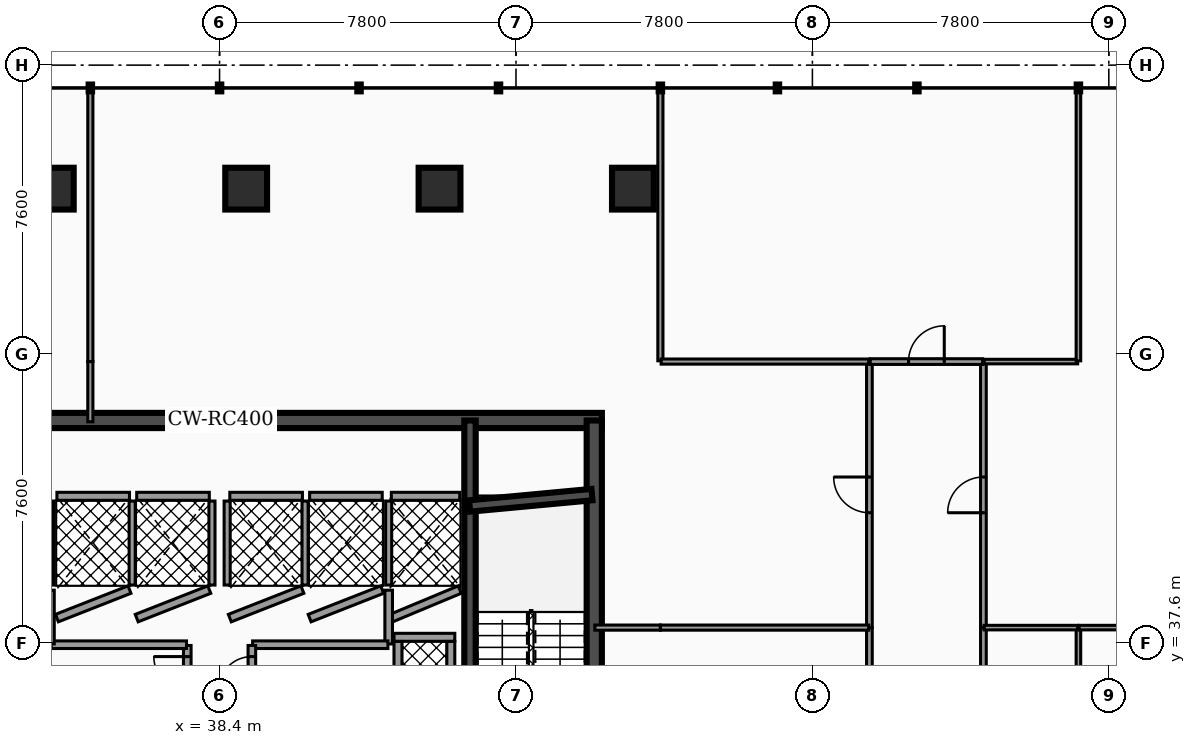
"""IFC4 building model, lengths in metres.
Left out: names, types, materials, properties, quantities, classifications, styles, units other than length and angle.
Written with IfcOpenShell. Run it as: python <this file> out.ifc"""

import sys

from ifc_helpers import new_model, si_unit, direction, frame, frame_2d, origin, origin_2d, place, context, subcontext, project, spatial, rectangle, hollow_rectangle, extrude, element, fill, save


model = new_model("IFC4")
c1 = context("Model", 3, precision=1e-05, world=origin(), true_north=direction((0.0, 1.0)))
c2 = subcontext(c1, "Body", "Model", "MODEL_VIEW")
j1 = project(units=[si_unit("LENGTHUNIT", "METRE"), si_unit("PLANEANGLEUNIT", "RADIAN")], contexts=[c1])
p1 = place(None, origin())
s1 = spatial("IfcSite", under=j1, at=p1, CompositionType="ELEMENT")
p2 = place(p1, origin())
s2 = spatial("IfcBuilding", under=s1, at=p2, CompositionType="ELEMENT")
p3 = place(p2, frame((0.0, 0.0, 5.1)))
s3 = spatial("IfcBuildingStorey", under=s2, at=p3, CompositionType="ELEMENT", Elevation=5.1)
p4 = place(p3, frame((28.4, 43.45, 0.0), z_axis=(0.0, 0.0, 1.0), x_axis=(1.0, 0.0, 0.0)))
e1 = element("IfcWall", 1, at=p4, inside=s3, PredefinedType="SHEAR", context=c2, shape_type="SweptSolid", body=[
    extrude(rectangle(XDim=20.06, YDim=0.4, at=frame_2d((10.03, 0.0))), origin(), (0.0, 0.0, 1.0), 4.14),
])
p5 = place(p3, frame((44.99, 33.25, 0.0), z_axis=(0.0, 0.0, 1.0), x_axis=(0.0, 1.0, 0.0)))
e2 = element("IfcWall", 2, at=p5, inside=s3, PredefinedType="SHEAR", context=c2, shape_type="SweptSolid", body=[
    extrude(rectangle(XDim=10.2, YDim=0.3, at=frame_2d((5.1, 0.0))), origin(), (0.0, 0.0, 1.0), 4.14),
])
p6 = place(p3, frame((48.26, 33.25, 0.0), z_axis=(0.0, 0.0, 1.0), x_axis=(0.0, 1.0, 0.0)))
e3 = element("IfcWall", 3, at=p6, inside=s3, PredefinedType="SHEAR", context=c2, shape_type="SweptSolid", body=[
    extrude(rectangle(XDim=10.2, YDim=0.4, at=frame_2d((5.1, 0.0))), origin(), (0.0, 0.0, 1.0), 4.14),
])
p7 = place(p3, frame((44.98, 41.2, 0.0), z_axis=(0.0, 0.0, 1.0), x_axis=(0.995686468965, 0.09278176286, 0.0)))
e4 = element("IfcWall", 4, at=p7, inside=s3, PredefinedType="SHEAR", context=c2, shape_type="SweptSolid", body=[
    extrude(rectangle(XDim=3.234, YDim=0.3, at=frame_2d((1.617, 0.0))), origin(), (0.0, 0.0, 1.0), 4.14),
])
for number, where, z_axis, x_axis in (
    (5, (49.277, 49.55, 0.0), (0.0, 0.0, 1.0), (1.0, 0.0, 0.0)),
    (6, (44.188, 49.55, 0.0), (0.0, 0.0, 1.0), (1.0, 0.0, 0.0)),
    (7, (39.1, 49.55, 0.0), (0.0, 0.0, 1.0), (1.0, 0.0, 0.0)),
    (8, (34.011, 49.55, 0.0), (0.0, 0.0, 1.0), (1.0, 0.0, 0.0)),
):
    element("IfcColumn", number, at=place(p3, frame(where, z_axis=z_axis, x_axis=x_axis)), inside=s3, PredefinedType="COLUMN", context=c2, shape_type="SweptSolid", body=[
        extrude(hollow_rectangle(XDim=1.1, YDim=1.1, WallThickness=0.055, at=origin_2d()), origin(), (0.0, 0.0, 1.0), 4.14),
    ])
p8 = place(p3, frame((33.95, 39.12, 0.0), z_axis=(0.0, 0.0, 1.0), x_axis=(0.0, 1.0, 0.0)))
e9 = element("IfcWall", 9, at=p8, inside=s3, PredefinedType="SOLIDWALL", context=c2, shape_type="SweptSolid", body=[
    extrude(rectangle(XDim=2.21, YDim=0.16, at=frame_2d((1.105, 0.0))), origin(), (0.0, 0.0, 1.0), 3.112),
])
p9 = place(p3, frame((42.92, 38.25, 0.0), z_axis=(0.0, 0.0, 1.0), x_axis=(0.9230806271, 0.384606494839, 0.0)))
e10 = element("IfcWall", 10, at=p9, inside=s3, PredefinedType="SOLIDWALL", context=c2, shape_type="SweptSolid", body=[
    extrude(rectangle(XDim=1.95, YDim=0.21, at=frame_2d((0.975, 0.0))), origin(), (0.0, 0.0, 1.0), 3.112),
])
p10 = place(p3, frame((42.92, 41.455, 0.0), z_axis=(0.0, 0.0, 1.0), x_axis=(1.0, 0.0, 0.0)))
e11 = element("IfcWall", 11, at=p10, inside=s3, PredefinedType="SOLIDWALL", context=c2, shape_type="SweptSolid", body=[
    extrude(rectangle(XDim=1.8, YDim=0.21, at=frame_2d((0.9, 0.0))), origin(), (0.0, 0.0, 1.0), 3.112),
])
p11 = place(p3, frame((42.85, 39.12, 0.0), z_axis=(0.0, 0.0, 1.0), x_axis=(0.0, 1.0, 0.0)))
e12 = element("IfcWall", 12, at=p11, inside=s3, PredefinedType="SOLIDWALL", context=c2, shape_type="SweptSolid", body=[
    extrude(rectangle(XDim=2.21, YDim=0.16, at=frame_2d((1.105, 0.0))), origin(), (0.0, 0.0, 1.0), 3.112),
])
p12 = place(p3, frame((34.12, 38.25, 0.0), z_axis=(0.0, 0.0, 1.0), x_axis=(0.930804993012, 0.36551616241, 0.0)))
e13 = element("IfcWall", 13, at=p12, inside=s3, PredefinedType="SOLIDWALL", context=c2, shape_type="SweptSolid", body=[
    extrude(rectangle(XDim=2.052, YDim=0.21, at=frame_2d((1.026, 0.0))), origin(), (0.0, 0.0, 1.0), 3.112),
])
p13 = place(p3, frame((34.12, 41.455, 0.0), z_axis=(0.0, 0.0, 1.0), x_axis=(1.0, 0.0, 0.0)))
e14 = element("IfcWall", 14, at=p13, inside=s3, PredefinedType="SOLIDWALL", context=c2, shape_type="SweptSolid", body=[
    extrude(rectangle(XDim=1.91, YDim=0.21, at=frame_2d((0.955, 0.0))), origin(), (0.0, 0.0, 1.0), 3.112),
])
p14 = place(p3, frame((36.1, 39.12, 0.0), z_axis=(0.0, 0.0, 1.0), x_axis=(0.0, 1.0, 0.0)))
e15 = element("IfcWall", 15, at=p14, inside=s3, PredefinedType="SOLIDWALL", context=c2, shape_type="SweptSolid", body=[
    extrude(rectangle(XDim=2.21, YDim=0.16, at=frame_2d((1.105, 0.0))), origin(), (0.0, 0.0, 1.0), 3.112),
])
p15 = place(p3, frame((36.22, 38.25, 0.0), z_axis=(0.0, 0.0, 1.0), x_axis=(0.930804993012, 0.36551616241, 0.0)))
e16 = element("IfcWall", 16, at=p15, inside=s3, PredefinedType="SOLIDWALL", context=c2, shape_type="SweptSolid", body=[
    extrude(rectangle(XDim=2.052, YDim=0.21, at=frame_2d((1.026, 0.0))), origin(), (0.0, 0.0, 1.0), 3.112),
])
p16 = place(p3, frame((36.22, 41.455, 0.0), z_axis=(0.0, 0.0, 1.0), x_axis=(1.0, 0.0, 0.0)))
e17 = element("IfcWall", 17, at=p16, inside=s3, PredefinedType="SOLIDWALL", context=c2, shape_type="SweptSolid", body=[
    extrude(rectangle(XDim=1.91, YDim=0.21, at=frame_2d((0.955, 0.0))), origin(), (0.0, 0.0, 1.0), 3.112),
])
p17 = place(p3, frame((38.2, 39.12, 0.0), z_axis=(0.0, 0.0, 1.0), x_axis=(0.0, 1.0, 0.0)))
e18 = element("IfcWall", 18, at=p17, inside=s3, PredefinedType="SOLIDWALL", context=c2, shape_type="SweptSolid", body=[
    extrude(rectangle(XDim=2.21, YDim=0.16, at=frame_2d((1.105, 0.0))), origin(), (0.0, 0.0, 1.0), 3.112),
])
p18 = place(p3, frame((38.67, 38.25, 0.0), z_axis=(0.0, 0.0, 1.0), x_axis=(0.930820886763, 0.3654756856, 0.0)))
e19 = element("IfcWall", 19, at=p18, inside=s3, PredefinedType="SOLIDWALL", context=c2, shape_type="SweptSolid", body=[
    extrude(rectangle(XDim=2.052, YDim=0.21, at=frame_2d((1.026, 0.0))), origin(), (0.0, 0.0, 1.0), 3.112),
])
p19 = place(p3, frame((38.67, 41.455, 0.0), z_axis=(0.0, 0.0, 1.0), x_axis=(1.0, 0.0, 0.0)))
e20 = element("IfcWall", 20, at=p19, inside=s3, PredefinedType="SOLIDWALL", context=c2, shape_type="SweptSolid", body=[
    extrude(rectangle(XDim=1.91, YDim=0.21, at=frame_2d((0.955, 0.0))), origin(), (0.0, 0.0, 1.0), 3.112),
])
for number, where, z_axis, x_axis in (
    (21, (38.6, 39.12, 0.0), (0.0, 0.0, 1.0), (0.0, 1.0, 0.0)),
    (22, (40.65, 39.12, 0.0), (0.0, 0.0, 1.0), (0.0, 1.0, 0.0)),
):
    element("IfcWall", number, at=place(p3, frame(where, z_axis=z_axis, x_axis=x_axis)), inside=s3, PredefinedType="SOLIDWALL", context=c2, shape_type="SweptSolid", body=[
        extrude(rectangle(XDim=2.21, YDim=0.16, at=frame_2d((1.105, 0.0))), origin(), (0.0, 0.0, 1.0), 3.112),
    ])
p20 = place(p3, frame((40.77, 38.25, 0.0), z_axis=(0.0, 0.0, 1.0), x_axis=(0.930804993012, 0.36551616241, 0.0)))
e23 = element("IfcWall", 23, at=p20, inside=s3, PredefinedType="SOLIDWALL", context=c2, shape_type="SweptSolid", body=[
    extrude(rectangle(XDim=2.052, YDim=0.21, at=frame_2d((1.026, 0.0))), origin(), (0.0, 0.0, 1.0), 3.112),
])
p21 = place(p3, frame((40.77, 41.455, 0.0), z_axis=(0.0, 0.0, 1.0), x_axis=(1.0, 0.0, 0.0)))
e24 = element("IfcWall", 24, at=p21, inside=s3, PredefinedType="SOLIDWALL", context=c2, shape_type="SweptSolid", body=[
    extrude(rectangle(XDim=1.91, YDim=0.21, at=frame_2d((0.955, 0.0))), origin(), (0.0, 0.0, 1.0), 3.112),
])
p22 = place(p3, frame((42.99, 37.745, 0.0), z_axis=(0.0, 0.0, 1.0), x_axis=(1.0, 0.0, 0.0)))
e25 = element("IfcWall", 25, at=p22, inside=s3, PredefinedType="SOLIDWALL", context=c2, shape_type="SweptSolid", body=[
    extrude(rectangle(XDim=1.6, YDim=0.21, at=frame_2d((0.8, 0.0))), origin(), (0.0, 0.0, 1.0), 4.14),
])
for number, where, z_axis, x_axis in (
    (26, (43.095, 36.485, 0.0), (0.0, 0.0, 1.0), (0.0, 1.0, 0.0)),
    (27, (44.485, 36.485, 0.0), (0.0, 0.0, 1.0), (0.0, 1.0, 0.0)),
):
    element("IfcWall", number, at=place(p3, frame(where, z_axis=z_axis, x_axis=x_axis)), inside=s3, PredefinedType="SOLIDWALL", context=c2, shape_type="SweptSolid", body=[
        extrude(rectangle(XDim=1.15, YDim=0.21, at=frame_2d((0.575, 0.0))), origin(), (0.0, 0.0, 1.0), 4.14),
    ])
p23 = place(p3, frame((37.55, 33.265, 0.0), z_axis=(0.0, 0.0, 1.0), x_axis=(0.0, 1.0, 0.0)))
e28 = element("IfcWall", 28, at=p23, inside=s3, PredefinedType="PARTITIONING", context=c2, shape_type="SweptSolid", body=[
    extrude(rectangle(XDim=4.265, YDim=0.2, at=frame_2d((2.133, 0.0))), origin(), (0.0, 0.0, 1.0), 3.097),
])
p24 = place(p23, frame((3.093, 0.0, 0.0)))
e29 = element("IfcOpeningElement", 29, at=p24, cuts=e28, PredefinedType="OPENING", context=c2, shape_type="SweptSolid", body=[
    extrude(rectangle(XDim=0.88, YDim=2.05, at=frame_2d((0.44, 1.025))), frame((0.0, 0.11, 0.0), z_axis=(0.0, -1.0, 0.0), x_axis=(1.0, 0.0, 0.0)), (0.0, 0.0, 1.0), 0.22),
])
p25 = place(p3, frame((33.97, 37.55, 0.0), z_axis=(0.0, 0.0, 1.0), x_axis=(1.0, 0.0, 0.0)))
e30 = element("IfcWall", 30, at=p25, inside=s3, PredefinedType="PARTITIONING", context=c2, shape_type="SweptSolid", body=[
    extrude(rectangle(XDim=3.56, YDim=0.2, at=frame_2d((1.78, 0.0))), origin(), (0.0, 0.0, 1.0), 3.097),
])
for number, where, z_axis, x_axis in (
    (31, (33.95, 37.57, 0.0), (0.0, 0.0, 1.0), (0.0, 1.0, 0.0)),
    (32, (42.85, 37.57, 0.0), (0.0, 0.0, 1.0), (0.0, 1.0, 0.0)),
):
    element("IfcWall", number, at=place(p3, frame(where, z_axis=z_axis, x_axis=x_axis)), inside=s3, PredefinedType="PARTITIONING", context=c2, shape_type="SweptSolid", body=[
        extrude(rectangle(XDim=1.415, YDim=0.2, at=frame_2d((0.708, 0.0))), origin(), (0.0, 0.0, 1.0), 3.097),
    ])
p26 = place(p3, frame((39.27, 37.55, 0.0), z_axis=(0.0, 0.0, 1.0), x_axis=(1.0, 0.0, 0.0)))
e33 = element("IfcWall", 33, at=p26, inside=s3, PredefinedType="PARTITIONING", context=c2, shape_type="SweptSolid", body=[
    extrude(rectangle(XDim=3.56, YDim=0.2, at=frame_2d((1.78, 0.0))), origin(), (0.0, 0.0, 1.0), 3.097),
])
p27 = place(p3, frame((39.25, 33.265, 0.0), z_axis=(0.0, 0.0, 1.0), x_axis=(0.0, 1.0, 0.0)))
e34 = element("IfcWall", 34, at=p27, inside=s3, PredefinedType="PARTITIONING", context=c2, shape_type="SweptSolid", body=[
    extrude(rectangle(XDim=4.265, YDim=0.2, at=frame_2d((2.133, 0.0))), origin(), (0.0, 0.0, 1.0), 3.097),
])
p28 = place(p27, frame((3.093, 0.0, 0.0)))
e35 = element("IfcOpeningElement", 35, at=p28, cuts=e34, PredefinedType="OPENING", context=c2, shape_type="SweptSolid", body=[
    extrude(rectangle(XDim=0.88, YDim=2.05, at=frame_2d((0.44, 1.025))), frame((0.0, 0.11, 0.0), z_axis=(0.0, -1.0, 0.0), x_axis=(1.0, 0.0, 0.0)), (0.0, 0.0, 1.0), 0.22),
])
p29 = place(p3, frame((58.5, 30.17, 0.0), z_axis=(0.0, 0.0, 1.0), x_axis=(0.0, 1.0, 0.0)))
e36 = element("IfcWall", 36, at=p29, inside=s3, PredefinedType="PARTITIONING", context=c2, shape_type="SweptSolid", body=[
    extrude(rectangle(XDim=7.825, YDim=0.15, at=frame_2d((3.913, 0.0))), origin(), (0.0, 0.0, 1.0), 3.097),
])
p30 = place(p29, frame((3.353, 0.0, 0.0)))
e37 = element("IfcOpeningElement", 37, at=p30, cuts=e36, PredefinedType="OPENING", context=c2, shape_type="SweptSolid", body=[
    extrude(rectangle(XDim=1.12, YDim=2.05, at=frame_2d((0.56, 1.025))), frame((0.0, 0.085, 0.0), z_axis=(0.0, -1.0, 0.0), x_axis=(1.0, 0.0, 0.0)), (0.0, 0.0, 1.0), 0.17),
])
p31 = place(p3, frame((55.5, 30.17, 0.0), z_axis=(0.0, 0.0, 1.0), x_axis=(0.0, 1.0, 0.0)))
e38 = element("IfcWall", 38, at=p31, inside=s3, PredefinedType="PARTITIONING", context=c2, shape_type="SweptSolid", body=[
    extrude(rectangle(XDim=7.825, YDim=0.15, at=frame_2d((3.913, 0.0))), origin(), (0.0, 0.0, 1.0), 3.097),
])
p32 = place(p31, frame((3.442, 0.0, 0.0)))
e39 = element("IfcOpeningElement", 39, at=p32, cuts=e38, PredefinedType="OPENING", context=c2, shape_type="SweptSolid", body=[
    extrude(rectangle(XDim=0.94, YDim=2.05, at=frame_2d((0.47, 1.025))), frame((0.0, 0.085, 0.0), z_axis=(0.0, -1.0, 0.0), x_axis=(1.0, 0.0, 0.0)), (0.0, 0.0, 1.0), 0.17),
])
p33 = place(p3, frame((55.5, 38.005, 0.0), z_axis=(0.0, 0.0, 1.0), x_axis=(0.0, 1.0, 0.0)))
e40 = element("IfcWall", 40, at=p33, inside=s3, PredefinedType="PARTITIONING", context=c2, shape_type="SweptSolid", body=[
    extrude(rectangle(XDim=6.975, YDim=0.15, at=frame_2d((3.488, 0.0))), origin(), (0.0, 0.0, 1.0), 3.097),
])
p34 = place(p33, frame((3.018, 0.0, 0.0)))
e41 = element("IfcOpeningElement", 41, at=p34, cuts=e40, PredefinedType="OPENING", context=c2, shape_type="SweptSolid", body=[
    extrude(rectangle(XDim=0.94, YDim=2.05, at=frame_2d((0.47, 1.025))), frame((0.0, 0.085, 0.0), z_axis=(0.0, -1.0, 0.0), x_axis=(1.0, 0.0, 0.0)), (0.0, 0.0, 1.0), 0.17),
])
p35 = place(p3, frame((58.5, 38.005, 0.0), z_axis=(0.0, 0.0, 1.0), x_axis=(0.0, 1.0, 0.0)))
e42 = element("IfcWall", 42, at=p35, inside=s3, PredefinedType="PARTITIONING", context=c2, shape_type="SweptSolid", body=[
    extrude(rectangle(XDim=6.975, YDim=0.15, at=frame_2d((3.488, 0.0))), origin(), (0.0, 0.0, 1.0), 3.097),
])
p36 = place(p35, frame((3.018, 0.0, 0.0)))
e43 = element("IfcOpeningElement", 43, at=p36, cuts=e42, PredefinedType="OPENING", context=c2, shape_type="SweptSolid", body=[
    extrude(rectangle(XDim=0.94, YDim=2.05, at=frame_2d((0.47, 1.025))), frame((0.0, 0.085, 0.0), z_axis=(0.0, -1.0, 0.0), x_axis=(1.0, 0.0, 0.0)), (0.0, 0.0, 1.0), 0.17),
])
p37 = place(p3, frame((55.52, 45.0, 0.0), z_axis=(0.0, 0.0, 1.0), x_axis=(1.0, 0.0, 0.0)))
e44 = element("IfcWall", 44, at=p37, inside=s3, PredefinedType="PARTITIONING", context=c2, shape_type="SweptSolid", body=[
    extrude(rectangle(XDim=2.96, YDim=0.15, at=frame_2d((1.48, 0.0))), origin(), (0.0, 0.0, 1.0), 3.097),
])
p38 = place(p37, frame((1.01, 0.0, 0.0)))
e45 = element("IfcOpeningElement", 45, at=p38, cuts=e44, PredefinedType="OPENING", context=c2, shape_type="SweptSolid", body=[
    extrude(rectangle(XDim=0.94, YDim=2.05, at=frame_2d((0.47, 1.025))), frame((0.0, 0.085, 0.0), z_axis=(0.0, -1.0, 0.0), x_axis=(1.0, 0.0, 0.0)), (0.0, 0.0, 1.0), 0.17),
])
p39 = place(p3, frame((61.0, 30.17, 0.0), z_axis=(0.0, 0.0, 1.0), x_axis=(0.0, 1.0, 0.0)))
e46 = element("IfcWall", 46, at=p39, inside=s3, PredefinedType="PARTITIONING", context=c2, shape_type="SweptSolid", body=[
    extrude(rectangle(XDim=7.81, YDim=0.12, at=frame_2d((3.905, 0.0))), origin(), (0.0, 0.0, 1.0), 3.097),
])
p40 = place(p3, frame((61.02, 38.0, 0.0), z_axis=(0.0, 0.0, 1.0), x_axis=(1.0, 0.0, 0.0)))
e47 = element("IfcWall", 47, at=p40, inside=s3, PredefinedType="PARTITIONING", context=c2, shape_type="SweptSolid", body=[
    extrude(rectangle(XDim=18.265, YDim=0.12, at=frame_2d((9.132, 0.0))), origin(), (0.0, 0.0, 1.0), 3.097),
])
p41 = place(p3, frame((35.0, 45.0, 0.0), z_axis=(0.0, 0.0, 1.0), x_axis=(0.0, 1.0, 0.0)))
e48 = element("IfcWall", 48, at=p41, inside=s3, PredefinedType="PARTITIONING", context=c2, shape_type="SweptSolid", body=[
    extrude(rectangle(XDim=7.185, YDim=0.135, at=frame_2d((3.593, 0.0))), origin(), (0.0, 0.0, 1.0), 3.097),
])
p42 = place(p3, frame((35.0, 43.415, 0.0), z_axis=(0.0, 0.0, 1.0), x_axis=(0.0, 1.0, 0.0)))
e49 = element("IfcWall", 49, at=p42, inside=s3, PredefinedType="PARTITIONING", context=c2, shape_type="SweptSolid", body=[
    extrude(rectangle(XDim=1.585, YDim=0.135, at=frame_2d((0.792, 0.0))), origin(), (0.0, 0.0, 1.0), 3.097),
])
p43 = place(p3, frame((58.52, 38.0, 0.0), z_axis=(0.0, 0.0, 1.0), x_axis=(1.0, 0.0, 0.0)))
e50 = element("IfcWall", 50, at=p43, inside=s3, PredefinedType="PARTITIONING", context=c2, shape_type="SweptSolid", body=[
    extrude(rectangle(XDim=2.46, YDim=0.12, at=frame_2d((1.23, 0.0))), origin(), (0.0, 0.0, 1.0), 3.097),
])
p44 = place(p3, frame((48.275, 38.0, 0.0), z_axis=(0.0, 0.0, 1.0), x_axis=(1.0, 0.0, 0.0)))
e51 = element("IfcWall", 51, at=p44, inside=s3, PredefinedType="PARTITIONING", context=c2, shape_type="SweptSolid", body=[
    extrude(rectangle(XDim=1.725, YDim=0.135, at=frame_2d((0.863, 0.0))), origin(), (0.0, 0.0, 1.0), 3.097),
])
p45 = place(p3, frame((50.0, 38.0, 0.0), z_axis=(0.0, 0.0, 1.0), x_axis=(1.0, 0.0, 0.0)))
e52 = element("IfcWall", 52, at=p45, inside=s3, PredefinedType="PARTITIONING", context=c2, shape_type="SweptSolid", body=[
    extrude(rectangle(XDim=5.48, YDim=0.135, at=frame_2d((2.74, 0.0))), origin(), (0.0, 0.0, 1.0), 3.097),
])
p46 = place(p3, frame((50.0, 45.02, 0.0), z_axis=(0.0, 0.0, 1.0), x_axis=(0.0, 1.0, 0.0)))
e53 = element("IfcWall", 53, at=p46, inside=s3, PredefinedType="PARTITIONING", context=c2, shape_type="SweptSolid", body=[
    extrude(rectangle(XDim=7.165, YDim=0.135, at=frame_2d((3.583, 0.0))), origin(), (0.0, 0.0, 1.0), 3.097),
])
p47 = place(p3, frame((50.02, 45.0, 0.0), z_axis=(0.0, 0.0, 1.0), x_axis=(1.0, 0.0, 0.0)))
e54 = element("IfcWall", 54, at=p47, inside=s3, PredefinedType="PARTITIONING", context=c2, shape_type="SweptSolid", body=[
    extrude(rectangle(XDim=5.46, YDim=0.135, at=frame_2d((2.73, 0.0))), origin(), (0.0, 0.0, 1.0), 3.097),
])
p48 = place(p3, frame((58.52, 45.0, 0.0), z_axis=(0.0, 0.0, 1.0), x_axis=(1.0, 0.0, 0.0)))
e55 = element("IfcWall", 55, at=p48, inside=s3, PredefinedType="PARTITIONING", context=c2, shape_type="SweptSolid", body=[
    extrude(rectangle(XDim=2.46, YDim=0.12, at=frame_2d((1.23, 0.0))), origin(), (0.0, 0.0, 1.0), 3.097),
])
p49 = place(p3, frame((61.0, 45.02, 0.0), z_axis=(0.0, 0.0, 1.0), x_axis=(0.0, 1.0, 0.0)))
e56 = element("IfcWall", 56, at=p49, inside=s3, PredefinedType="PARTITIONING", context=c2, shape_type="SweptSolid", body=[
    extrude(rectangle(XDim=7.165, YDim=0.12, at=frame_2d((3.583, 0.0))), origin(), (0.0, 0.0, 1.0), 3.097),
])
p50 = place(p24, origin())
e57 = element("IfcDoor", 57, at=p50, inside=s3, OperationType="SINGLE_SWING_RIGHT", PredefinedType="DOOR", context=c2, shape_type="SweptSolid", body=[
    extrude(rectangle(XDim=0.88, YDim=2.05, at=frame_2d((0.44, 1.025))), frame((0.0, 0.025, 0.0), z_axis=(0.0, -1.0, 0.0), x_axis=(1.0, 0.0, 0.0)), (0.0, 0.0, 1.0), 0.05),
])
fill(e29, e57)
p51 = place(p28, origin())
e58 = element("IfcDoor", 58, at=p51, inside=s3, OperationType="SINGLE_SWING_LEFT", PredefinedType="DOOR", context=c2, shape_type="SweptSolid", body=[
    extrude(rectangle(XDim=0.88, YDim=2.05, at=frame_2d((0.44, 1.025))), frame((0.0, 0.025, 0.0), z_axis=(0.0, -1.0, 0.0), x_axis=(1.0, 0.0, 0.0)), (0.0, 0.0, 1.0), 0.05),
])
fill(e35, e58)
p52 = place(p34, origin())
e59 = element("IfcDoor", 59, at=p52, inside=s3, OperationType="SINGLE_SWING_RIGHT", PredefinedType="DOOR", context=c2, shape_type="SweptSolid", body=[
    extrude(rectangle(XDim=0.94, YDim=2.05, at=frame_2d((0.47, 1.025))), frame((0.0, 0.025, 0.0), z_axis=(0.0, -1.0, 0.0), x_axis=(1.0, 0.0, 0.0)), (0.0, 0.0, 1.0), 0.05),
])
fill(e41, e59)
p53 = place(p36, origin())
e60 = element("IfcDoor", 60, at=p53, inside=s3, OperationType="SINGLE_SWING_LEFT", PredefinedType="DOOR", context=c2, shape_type="SweptSolid", body=[
    extrude(rectangle(XDim=0.94, YDim=2.05, at=frame_2d((0.47, 1.025))), frame((0.0, 0.025, 0.0), z_axis=(0.0, -1.0, 0.0), x_axis=(1.0, 0.0, 0.0)), (0.0, 0.0, 1.0), 0.05),
])
fill(e43, e60)
p54 = place(p38, origin())
e61 = element("IfcDoor", 61, at=p54, inside=s3, OperationType="SINGLE_SWING_RIGHT", PredefinedType="DOOR", context=c2, shape_type="SweptSolid", body=[
    extrude(rectangle(XDim=0.94, YDim=2.05, at=frame_2d((0.47, 1.025))), frame((0.0, 0.025, 0.0), z_axis=(0.0, -1.0, 0.0), x_axis=(1.0, 0.0, 0.0)), (0.0, 0.0, 1.0), 0.05),
])
fill(e45, e61)
save(model, sys.argv[1])
